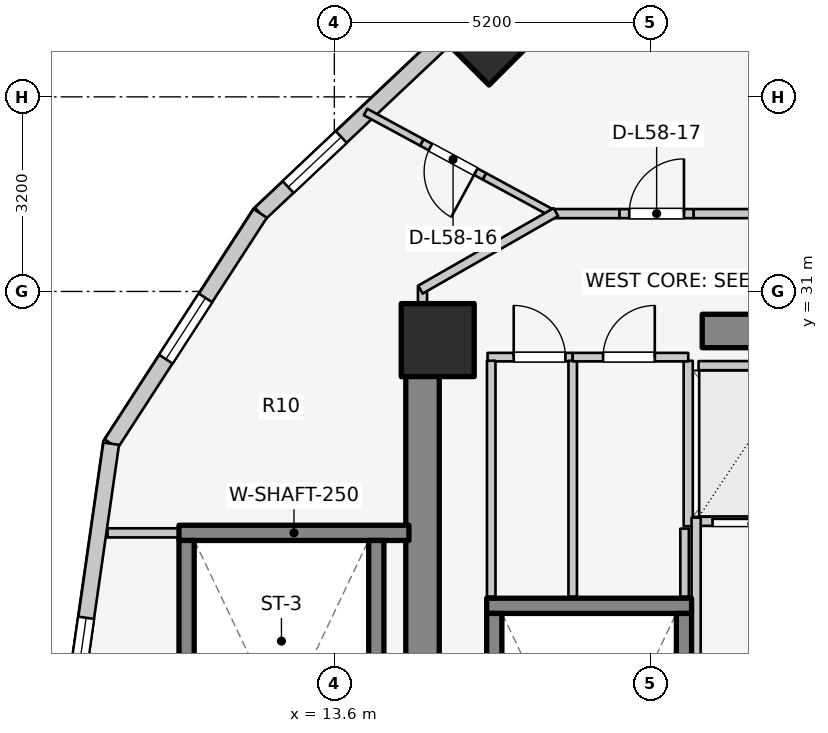
"""IFC4 building model, lengths in metres.
Left out: names, types, materials, properties, quantities, classifications, styles, units other than length and angle.
Written with IfcOpenShell. Run it as: python <this file> out.ifc"""

import sys

from ifc_helpers import new_model, si_unit, direction, frame, frame_2d, origin, origin_2d, place, context, subcontext, project, spatial, rectangle, extrude, element, fill, save


model = new_model("IFC4")
c1 = context("Model", 3, precision=1e-05, world=origin(), true_north=direction((0.0, 1.0)))
c2 = subcontext(c1, "Body", "Model", "MODEL_VIEW")
j1 = project(units=[si_unit("LENGTHUNIT", "METRE"), si_unit("PLANEANGLEUNIT", "RADIAN")], contexts=[c1])
p1 = place(None, origin())
s1 = spatial("IfcSite", under=j1, at=p1, CompositionType="ELEMENT")
p2 = place(p1, origin())
s2 = spatial("IfcBuilding", under=s1, at=p2, CompositionType="ELEMENT")
p3 = place(p2, frame((0.0, 0.0, 190.1)))
s3 = spatial("IfcBuildingStorey", under=s2, at=p3, CompositionType="ELEMENT", Elevation=190.1)
p4 = place(p3, frame((15.05, 17.05, 0.0), z_axis=(0.0, 0.0, 1.0), x_axis=(0.0, 1.0, 0.0)))
e1 = element("IfcWall", 1, at=p4, inside=s3, PredefinedType="SHEAR", context=c2, shape_type="SweptSolid", body=[
    extrude(rectangle(XDim=12.8, YDim=0.55, at=frame_2d((6.4, 0.0))), origin(), (0.0, 0.0, 1.0), 3.1),
])
p5 = place(p3, frame((19.65, 30.35, 0.0), z_axis=(0.0, 0.0, 1.0), x_axis=(1.0, 0.0, 0.0)))
e2 = element("IfcWall", 2, at=p5, inside=s3, PredefinedType="SHEAR", context=c2, shape_type="SweptSolid", body=[
    extrude(rectangle(XDim=4.5, YDim=0.55, at=frame_2d((2.25, 0.0))), origin(), (0.0, 0.0, 1.0), 3.1),
])
p6 = place(p3, frame((16.105, 25.83, 0.0), z_axis=(0.0, 0.0, 1.0), x_axis=(1.0, 0.0, 0.0)))
e3 = element("IfcWall", 3, at=p6, inside=s3, PredefinedType="SOLIDWALL", context=c2, shape_type="SweptSolid", body=[
    extrude(rectangle(XDim=3.37, YDim=0.25, at=frame_2d((1.685, 0.0))), origin(), (0.0, 0.0, 1.0), 3.1),
])
for number, where, z_axis, x_axis in (
    (4, (16.23, 17.895, 0.0), (0.0, 0.0, 1.0), (0.0, 1.0, 0.0)),
    (5, (19.35, 17.895, 0.0), (0.0, 0.0, 1.0), (0.0, 1.0, 0.0)),
):
    element("IfcWall", number, at=place(p3, frame(where, z_axis=z_axis, x_axis=x_axis)), inside=s3, PredefinedType="SOLIDWALL", context=c2, shape_type="SweptSolid", body=[
        extrude(rectangle(XDim=7.81, YDim=0.25, at=frame_2d((3.905, 0.0))), origin(), (0.0, 0.0, 1.0), 3.1),
    ])
p7 = place(p3, frame((11.045, 27.03, 0.0), z_axis=(0.0, 0.0, 1.0), x_axis=(1.0, 0.0, 0.0)))
e6 = element("IfcWall", 6, at=p7, inside=s3, PredefinedType="SOLIDWALL", context=c2, shape_type="SweptSolid", body=[
    extrude(rectangle(XDim=3.782, YDim=0.25, at=frame_2d((1.891, 0.0))), origin(), (0.0, 0.0, 1.0), 3.1),
])
for number, where, z_axis, x_axis in (
    (7, (11.17, 19.095, 0.0), (0.0, 0.0, 1.0), (0.0, 1.0, 0.0)),
    (8, (14.29, 19.095, 0.0), (0.0, 0.0, 1.0), (0.0, 1.0, 0.0)),
):
    element("IfcWall", number, at=place(p3, frame(where, z_axis=z_axis, x_axis=x_axis)), inside=s3, PredefinedType="SOLIDWALL", context=c2, shape_type="SweptSolid", body=[
        extrude(rectangle(XDim=7.81, YDim=0.25, at=frame_2d((3.905, 0.0))), origin(), (0.0, 0.0, 1.0), 3.1),
    ])
p8 = place(p3, frame((15.3, 30.2, 0.0), z_axis=(0.0, 0.0, 1.0), x_axis=(1.0, 0.0, 0.0)))
e9 = element("IfcColumn", 9, at=p8, inside=s3, PredefinedType="COLUMN", context=c2, shape_type="SweptSolid", body=[
    extrude(rectangle(XDim=1.2, YDim=1.2, at=origin_2d()), origin(), (0.0, 0.0, 1.0), 3.1),
])
p9 = place(p3, frame((16.143, 35.031, 0.0), z_axis=(0.0, 0.0, 1.0), x_axis=(-0.707106781187, 0.707106781187, 0.0)))
e10 = element("IfcColumn", 10, at=p9, inside=s3, PredefinedType="COLUMN", context=c2, shape_type="SweptSolid", body=[
    extrude(rectangle(XDim=0.9, YDim=0.9, at=origin_2d()), origin(), (0.0, 0.0, 1.0), 3.1),
])
p10 = place(p3, frame((15.731, 35.441, 0.0), z_axis=(0.0, 0.0, 1.0), x_axis=(-0.727667301037, -0.68593024354, 0.0)))
e11 = element("IfcWall", 11, at=p10, inside=s3, PredefinedType="STANDARD", context=c2, shape_type="SweptSolid", body=[
    extrude(rectangle(XDim=4.604, YDim=0.26, at=frame_2d((2.302, 0.0))), origin(), (0.0, 0.0, 1.0), 1.22),
])
p11 = place(p10, frame((2.772, 0.0, 0.15)))
e12 = element("IfcOpeningElement", 12, at=p11, cuts=e11, PredefinedType="OPENING", context=c2, shape_type="SweptSolid", body=[
    extrude(rectangle(XDim=1.2, YDim=0.9, at=frame_2d((0.6, 0.45))), frame((0.0, 0.14, 0.0), z_axis=(0.0, -1.0, 0.0), x_axis=(1.0, 0.0, 0.0)), (0.0, 0.0, 1.0), 0.28),
])
p12 = place(p3, frame((12.381, 32.284, 0.0), z_axis=(0.0, 0.0, 1.0), x_axis=(-0.543358984534, -0.839500454989, 0.0)))
e13 = element("IfcWall", 13, at=p12, inside=s3, PredefinedType="STANDARD", context=c2, shape_type="SweptSolid", body=[
    extrude(rectangle(XDim=4.511, YDim=0.26, at=frame_2d((2.256, 0.0))), origin(), (0.0, 0.0, 1.0), 1.22),
])
p13 = place(p12, frame((1.656, 0.0, 0.15)))
e14 = element("IfcOpeningElement", 14, at=p13, cuts=e13, PredefinedType="OPENING", context=c2, shape_type="SweptSolid", body=[
    extrude(rectangle(XDim=1.2, YDim=0.9, at=frame_2d((0.6, 0.45))), frame((0.0, 0.14, 0.0), z_axis=(0.0, -1.0, 0.0), x_axis=(1.0, 0.0, 0.0)), (0.0, 0.0, 1.0), 0.28),
])
p14 = place(p3, frame((9.93, 28.497, 0.0), z_axis=(0.0, 0.0, 1.0), x_axis=(-0.142227632286, -0.989833976288, 0.0)))
e15 = element("IfcWall", 15, at=p14, inside=s3, PredefinedType="STANDARD", context=c2, shape_type="SweptSolid", body=[
    extrude(rectangle(XDim=5.553, YDim=0.26, at=frame_2d((2.776, 0.0))), origin(), (0.0, 0.0, 1.0), 2.57),
])
p15 = place(p14, frame((2.892, 0.0, 0.75)))
e16 = element("IfcOpeningElement", 16, at=p15, cuts=e15, PredefinedType="OPENING", context=c2, shape_type="SweptSolid", body=[
    extrude(rectangle(XDim=1.2, YDim=1.5, at=frame_2d((0.6, 0.75))), frame((0.0, 0.14, 0.0), z_axis=(0.0, -1.0, 0.0), x_axis=(1.0, 0.0, 0.0)), (0.0, 0.0, 1.0), 0.28),
])
p16 = place(p3, frame((19.59, 27.22, 0.0), z_axis=(0.0, 0.0, 1.0), x_axis=(1.0, 0.0, 0.0)))
e17 = element("IfcWall", 17, at=p16, inside=s3, PredefinedType="SOLIDWALL", context=c2, shape_type="SweptSolid", body=[
    extrude(rectangle(XDim=1.76, YDim=0.15, at=frame_2d((0.88, 0.0))), origin(), (0.0, 0.0, 1.0), 2.575),
])
p17 = place(p16, frame((0.23, 0.0, 0.0)))
e18 = element("IfcOpeningElement", 18, at=p17, cuts=e17, PredefinedType="OPENING", context=c2, shape_type="SweptSolid", body=[
    extrude(rectangle(XDim=1.3, YDim=2.1, at=frame_2d((0.65, 1.05))), frame((0.0, 0.085, 0.0), z_axis=(0.0, -1.0, 0.0), x_axis=(1.0, 0.0, 0.0)), (0.0, 0.0, 1.0), 0.17),
])
p18 = place(p3, frame((19.59, 29.78, 0.0), z_axis=(0.0, 0.0, 1.0), x_axis=(1.0, 0.0, 0.0)))
e19 = element("IfcWall", 19, at=p18, inside=s3, PredefinedType="SOLIDWALL", context=c2, shape_type="SweptSolid", body=[
    extrude(rectangle(XDim=1.76, YDim=0.15, at=frame_2d((0.88, 0.0))), origin(), (0.0, 0.0, 1.0), 2.575),
])
p19 = place(p3, frame((19.42, 27.14, 0.0), z_axis=(0.0, 0.0, 1.0), x_axis=(0.0, 1.0, 0.0)))
e20 = element("IfcWall", 20, at=p19, inside=s3, PredefinedType="SOLIDWALL", context=c2, shape_type="SweptSolid", body=[
    extrude(rectangle(XDim=2.72, YDim=0.15, at=frame_2d((1.36, 0.0))), origin(), (0.0, 0.0, 1.0), 2.575),
])
p20 = place(p3, frame((19.55, 24.08, 0.0), z_axis=(0.0, 0.0, 1.0), x_axis=(0.0, 1.0, 0.0)))
e21 = element("IfcWall", 21, at=p20, inside=s3, PredefinedType="PARTITIONING", context=c2, shape_type="SweptSolid", body=[
    extrude(rectangle(XDim=3.2, YDim=0.15, at=frame_2d((1.6, 0.0))), origin(), (0.0, 0.0, 1.0), 2.575),
])
p21 = place(p3, frame((16.12, 29.92, 0.0), z_axis=(0.0, 0.0, 1.0), x_axis=(1.0, 0.0, 0.0)))
e22 = element("IfcWall", 22, at=p21, inside=s3, PredefinedType="PLUMBINGWALL", context=c2, shape_type="SweptSolid", body=[
    extrude(rectangle(XDim=1.4, YDim=0.14, at=frame_2d((0.7, 0.0))), origin(), (0.0, 0.0, 1.0), 2.575),
])
p22 = place(p21, frame((0.43, 0.0, 0.0)))
e23 = element("IfcOpeningElement", 23, at=p22, cuts=e22, PredefinedType="OPENING", context=c2, shape_type="SweptSolid", body=[
    extrude(rectangle(XDim=0.85, YDim=2.05, at=frame_2d((0.425, 1.025))), frame((0.0, 0.08, 0.0), z_axis=(0.0, -1.0, 0.0), x_axis=(1.0, 0.0, 0.0)), (0.0, 0.0, 1.0), 0.16),
])
for number, where, z_axis, x_axis in (
    (24, (16.18, 25.98, 0.0), (0.0, 0.0, 1.0), (0.0, 1.0, 0.0)),
    (25, (17.52, 25.98, 0.0), (0.0, 0.0, 1.0), (0.0, 1.0, 0.0)),
):
    element("IfcWall", number, at=place(p3, frame(where, z_axis=z_axis, x_axis=x_axis)), inside=s3, PredefinedType="PLUMBINGWALL", context=c2, shape_type="SweptSolid", body=[
        extrude(rectangle(XDim=3.88, YDim=0.14, at=frame_2d((1.94, 0.0))), origin(), (0.0, 0.0, 1.0), 2.575),
    ])
p23 = place(p3, frame((17.52, 29.92, 0.0), z_axis=(0.0, 0.0, 1.0), x_axis=(1.0, 0.0, 0.0)))
e26 = element("IfcWall", 26, at=p23, inside=s3, PredefinedType="PLUMBINGWALL", context=c2, shape_type="SweptSolid", body=[
    extrude(rectangle(XDim=1.9, YDim=0.14, at=frame_2d((0.95, 0.0))), origin(), (0.0, 0.0, 1.0), 2.575),
])
p24 = place(p23, frame((0.5, 0.0, 0.0)))
e27 = element("IfcOpeningElement", 27, at=p24, cuts=e26, PredefinedType="OPENING", context=c2, shape_type="SweptSolid", body=[
    extrude(rectangle(XDim=0.85, YDim=2.05, at=frame_2d((0.425, 1.025))), frame((0.0, 0.08, 0.0), z_axis=(0.0, -1.0, 0.0), x_axis=(1.0, 0.0, 0.0)), (0.0, 0.0, 1.0), 0.16),
])
p25 = place(p3, frame((19.36, 25.98, 0.0), z_axis=(0.0, 0.0, 1.0), x_axis=(0.0, 1.0, 0.0)))
e28 = element("IfcWall", 28, at=p25, inside=s3, PredefinedType="PLUMBINGWALL", context=c2, shape_type="SweptSolid", body=[
    extrude(rectangle(XDim=1.12, YDim=0.14, at=frame_2d((0.56, 0.0))), origin(), (0.0, 0.0, 1.0), 2.575),
])
p26 = place(p3, frame((9.87, 27.03, 0.0), z_axis=(0.0, 0.0, 1.0), x_axis=(1.0, 0.0, 0.0)))
e29 = element("IfcWall", 29, at=p26, inside=s3, PredefinedType="PARTITIONING", context=c2, shape_type="SweptSolid", body=[
    extrude(rectangle(XDim=1.17, YDim=0.15, at=frame_2d((0.585, 0.0))), origin(), (0.0, 0.0, 1.0), 2.575),
])
p27 = place(p3, frame((15.05, 29.8, 0.0), z_axis=(0.0, 0.0, 1.0), x_axis=(0.0, 1.0, 0.0)))
e30 = element("IfcWall", 30, at=p27, inside=s3, PredefinedType="PARTITIONING", context=c2, shape_type="SweptSolid", body=[
    extrude(rectangle(XDim=1.29, YDim=0.15, at=frame_2d((0.645, 0.0))), origin(), (0.0, 0.0, 1.0), 1.22),
])
p28 = place(p3, frame((17.244, 32.256, 0.0), z_axis=(0.0, 0.0, 1.0), x_axis=(-0.879396983738, 0.476089219572, 0.0)))
e31 = element("IfcWall", 31, at=p28, inside=s3, PredefinedType="MOVABLE", context=c2, shape_type="SweptSolid", body=[
    extrude(rectangle(XDim=1.338, YDim=0.12, at=frame_2d((0.669, 0.0))), origin(), (0.0, 0.0, 1.0), 1.22),
])
p29 = place(p3, frame((16.067, 32.893, 0.0), z_axis=(0.0, 0.0, 1.0), x_axis=(-0.879342939039, 0.476189033433, 0.0)))
e32 = element("IfcWall", 32, at=p29, inside=s3, PredefinedType="MOVABLE", context=c2, shape_type="SweptSolid", body=[
    extrude(rectangle(XDim=1.17, YDim=0.12, at=frame_2d((0.585, 0.0))), origin(), (0.0, 0.0, 1.0), 2.11),
])
p30 = place(p29, frame((0.16, 0.0, 0.0)))
e33 = element("IfcOpeningElement", 33, at=p30, cuts=e32, PredefinedType="OPENING", context=c2, shape_type="SweptSolid", body=[
    extrude(rectangle(XDim=0.85, YDim=2.05, at=frame_2d((0.425, 1.025))), frame((0.0, 0.07, 0.0), z_axis=(0.0, -1.0, 0.0), x_axis=(1.0, 0.0, 0.0)), (0.0, 0.0, 1.0), 0.14),
])
p31 = place(p3, frame((15.038, 33.45, 0.0), z_axis=(0.0, 0.0, 1.0), x_axis=(-0.879417553007, 0.476051223571, 0.0)))
e34 = element("IfcWall", 34, at=p31, inside=s3, PredefinedType="MOVABLE", context=c2, shape_type="SweptSolid", body=[
    extrude(rectangle(XDim=1.051, YDim=0.12, at=frame_2d((0.526, 0.0))), origin(), (0.0, 0.0, 1.0), 2.575),
])
p32 = place(p3, frame((17.15, 32.28, 0.0), z_axis=(0.0, 0.0, 1.0), x_axis=(1.0, 0.0, 0.0)))
e35 = element("IfcWall", 35, at=p32, inside=s3, PredefinedType="PARTITIONING", context=c2, shape_type="SweptSolid", body=[
    extrude(rectangle(XDim=1.14, YDim=0.15, at=frame_2d((0.57, 0.0))), origin(), (0.0, 0.0, 1.0), 2.575),
])
p33 = place(p3, frame((18.29, 32.28, 0.0), z_axis=(0.0, 0.0, 1.0), x_axis=(1.0, 0.0, 0.0)))
e36 = element("IfcWall", 36, at=p33, inside=s3, PredefinedType="PARTITIONING", context=c2, shape_type="SweptSolid", body=[
    extrude(rectangle(XDim=1.22, YDim=0.15, at=frame_2d((0.61, 0.0))), origin(), (0.0, 0.0, 1.0), 2.575),
])
p34 = place(p33, frame((0.16, 0.0, 0.0)))
e37 = element("IfcOpeningElement", 37, at=p34, cuts=e36, PredefinedType="OPENING", context=c2, shape_type="SweptSolid", body=[
    extrude(rectangle(XDim=0.9, YDim=2.1, at=frame_2d((0.45, 1.05))), frame((0.0, 0.085, 0.0), z_axis=(0.0, -1.0, 0.0), x_axis=(1.0, 0.0, 0.0)), (0.0, 0.0, 1.0), 0.17),
])
p35 = place(p3, frame((19.51, 32.28, 0.0), z_axis=(0.0, 0.0, 1.0), x_axis=(1.0, 0.0, 0.0)))
e38 = element("IfcWall", 38, at=p35, inside=s3, PredefinedType="PARTITIONING", context=c2, shape_type="SweptSolid", body=[
    extrude(rectangle(XDim=5.16, YDim=0.15, at=frame_2d((2.58, 0.0))), origin(), (0.0, 0.0, 1.0), 1.22),
])
p36 = place(p3, frame((17.243, 32.305, 0.0), z_axis=(0.0, 0.0, 1.0), x_axis=(-0.867991349648, -0.496579315857, 0.0)))
e39 = element("IfcWall", 39, at=p36, inside=s3, PredefinedType="PARTITIONING", context=c2, shape_type="SweptSolid", body=[
    extrude(rectangle(XDim=2.567, YDim=0.15, at=frame_2d((1.283, 0.0))), origin(), (0.0, 0.0, 1.0), 1.22),
])
p37 = place(p3, frame((26.188, 33.708, 0.0), z_axis=(0.0, 0.0, 1.0), x_axis=(-0.844640430122, 0.535334048799, 0.0)))
e40 = element("IfcWall", 40, at=p37, inside=s3, PredefinedType="PARTITIONING", context=c2, shape_type="SweptSolid", body=[
    extrude(rectangle(XDim=7.188, YDim=0.125, at=frame_2d((3.594, 0.0))), origin(), (0.0, 0.0, 1.0), 1.22),
])
p38 = place(p11, origin())
e41 = element("IfcWindow", 41, at=p38, inside=s3, PartitioningType="SINGLE_PANEL", PredefinedType="WINDOW", context=c2, shape_type="SweptSolid", body=[
    extrude(rectangle(XDim=1.2, YDim=0.9, at=frame_2d((0.6, 0.45))), frame((0.0, 0.03, 0.0), z_axis=(0.0, -1.0, 0.0), x_axis=(1.0, 0.0, 0.0)), (0.0, 0.0, 1.0), 0.06),
])
fill(e12, e41)
p39 = place(p13, origin())
e42 = element("IfcWindow", 42, at=p39, inside=s3, PartitioningType="SINGLE_PANEL", PredefinedType="WINDOW", context=c2, shape_type="SweptSolid", body=[
    extrude(rectangle(XDim=1.2, YDim=0.9, at=frame_2d((0.6, 0.45))), frame((0.0, 0.03, 0.0), z_axis=(0.0, -1.0, 0.0), x_axis=(1.0, 0.0, 0.0)), (0.0, 0.0, 1.0), 0.06),
])
fill(e14, e42)
p40 = place(p15, origin())
e43 = element("IfcWindow", 43, at=p40, inside=s3, PartitioningType="SINGLE_PANEL", PredefinedType="WINDOW", context=c2, shape_type="SweptSolid", body=[
    extrude(rectangle(XDim=1.2, YDim=1.5, at=frame_2d((0.6, 0.75))), frame((0.0, 0.03, 0.0), z_axis=(0.0, -1.0, 0.0), x_axis=(1.0, 0.0, 0.0)), (0.0, 0.0, 1.0), 0.06),
])
fill(e16, e43)
p41 = place(p17, origin())
e44 = element("IfcDoor", 44, at=p41, inside=s3, OperationType="DOUBLE_DOOR_SLIDING", PredefinedType="DOOR", context=c2, shape_type="SweptSolid", body=[
    extrude(rectangle(XDim=1.3, YDim=2.1, at=frame_2d((0.65, 1.05))), frame((0.0, 0.025, 0.0), z_axis=(0.0, -1.0, 0.0), x_axis=(1.0, 0.0, 0.0)), (0.0, 0.0, 1.0), 0.05),
])
fill(e18, e44)
p42 = place(p22, origin())
e45 = element("IfcDoor", 45, at=p42, inside=s3, OperationType="SINGLE_SWING_LEFT", PredefinedType="DOOR", context=c2, shape_type="SweptSolid", body=[
    extrude(rectangle(XDim=0.85, YDim=2.05, at=frame_2d((0.425, 1.025))), frame((0.0, 0.025, 0.0), z_axis=(0.0, -1.0, 0.0), x_axis=(1.0, 0.0, 0.0)), (0.0, 0.0, 1.0), 0.05),
])
fill(e23, e45)
p43 = place(p24, origin())
e46 = element("IfcDoor", 46, at=p43, inside=s3, OperationType="SINGLE_SWING_RIGHT", PredefinedType="DOOR", context=c2, shape_type="SweptSolid", body=[
    extrude(rectangle(XDim=0.85, YDim=2.05, at=frame_2d((0.425, 1.025))), frame((0.0, 0.025, 0.0), z_axis=(0.0, -1.0, 0.0), x_axis=(1.0, 0.0, 0.0)), (0.0, 0.0, 1.0), 0.05),
])
fill(e27, e46)
p44 = place(p30, origin())
e47 = element("IfcDoor", 47, at=p44, inside=s3, OperationType="SINGLE_SWING_LEFT", PredefinedType="DOOR", context=c2, shape_type="SweptSolid", body=[
    extrude(rectangle(XDim=0.85, YDim=2.05, at=frame_2d((0.425, 1.025))), frame((0.0, 0.025, 0.0), z_axis=(0.0, -1.0, 0.0), x_axis=(1.0, 0.0, 0.0)), (0.0, 0.0, 1.0), 0.05),
])
fill(e33, e47)
p45 = place(p34, origin())
e48 = element("IfcDoor", 48, at=p45, inside=s3, OperationType="SINGLE_SWING_RIGHT", PredefinedType="DOOR", context=c2, shape_type="SweptSolid", body=[
    extrude(rectangle(XDim=0.9, YDim=2.1, at=frame_2d((0.45, 1.05))), frame((0.0, 0.025, 0.0), z_axis=(0.0, -1.0, 0.0), x_axis=(1.0, 0.0, 0.0)), (0.0, 0.0, 1.0), 0.05),
])
fill(e37, e48)
save(model, sys.argv[1])
